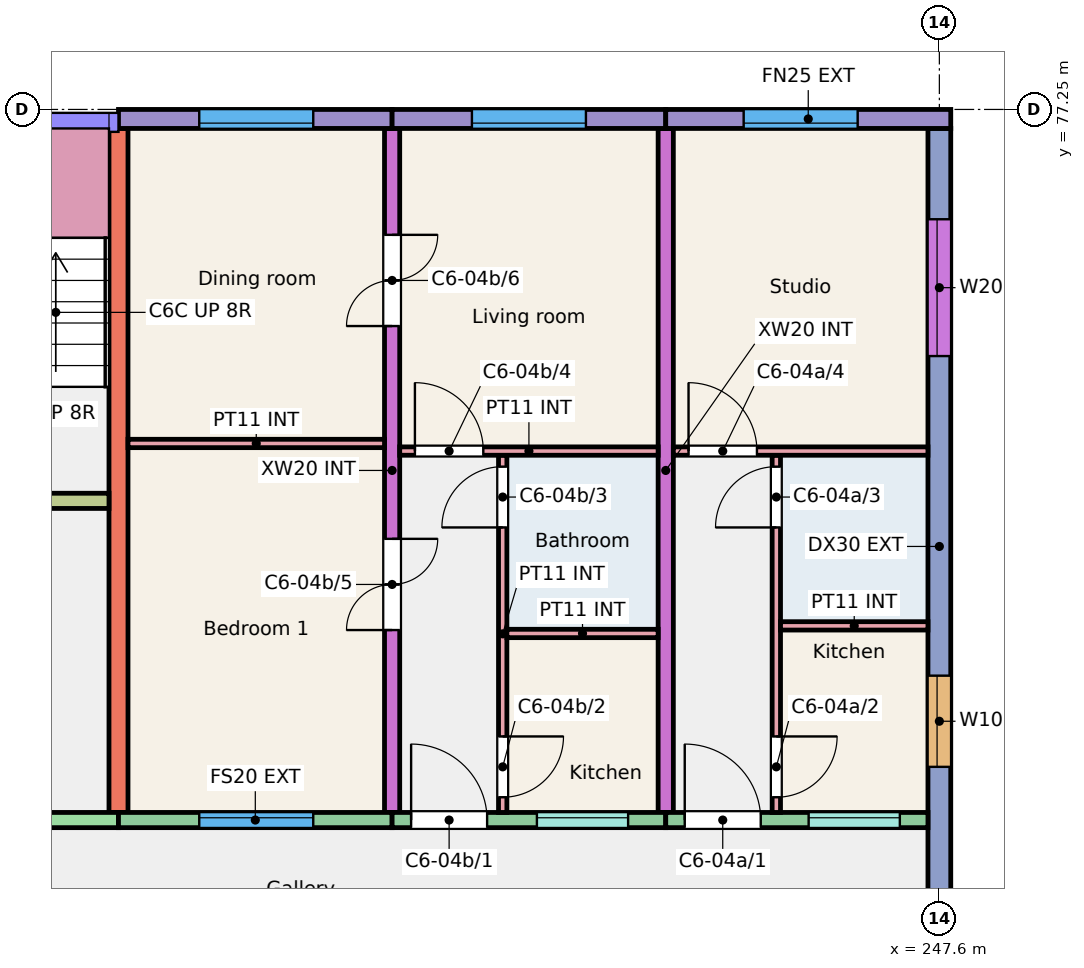
"""IFC4 building model, lengths in metres.
Left out: names, types, materials, properties, quantities, classifications, styles, units other than length and angle.
Written with IfcOpenShell. Run it as: python <this file> out.ifc"""

import sys

from ifc_helpers import new_model, si_unit, direction, frame, frame_2d, origin, place, context, subcontext, project, spatial, rectangle, extrude, element, fill, save


model = new_model("IFC4")
c1 = context("Model", 3, precision=1e-05, world=origin(), true_north=direction((0.0, 1.0)))
c2 = subcontext(c1, "Body", "Model", "MODEL_VIEW")
j1 = project(units=[si_unit("LENGTHUNIT", "METRE"), si_unit("PLANEANGLEUNIT", "RADIAN")], contexts=[c1])
p1 = place(None, origin())
s1 = spatial("IfcSite", under=j1, at=p1, CompositionType="ELEMENT")
p2 = place(p1, origin())
s2 = spatial("IfcBuilding", under=s1, at=p2, CompositionType="ELEMENT")
p3 = place(p2, frame((0.0, 0.0, 12.0)))
s3 = spatial("IfcBuildingStorey", under=s2, at=p3, CompositionType="ELEMENT", Elevation=12.0)
p4 = place(p3, frame((236.8, 68.0, 0.0), z_axis=(0.0, 0.0, 1.0), x_axis=(0.0, 1.0, 0.0)))
e1 = element("IfcWall", 1, at=p4, inside=s3, PredefinedType="SHEAR", context=c2, shape_type="SweptSolid", body=[
    extrude(rectangle(XDim=9.0, YDim=0.25, at=frame_2d((4.5, 0.0))), origin(), (0.0, 0.0, 1.0), 3.0),
])
p5 = place(p3, frame((240.4, 68.0, 0.0), z_axis=(0.0, 0.0, 1.0), x_axis=(0.0, 1.0, 0.0)))
e2 = element("IfcWall", 2, at=p5, inside=s3, PredefinedType="SHEAR", context=c2, shape_type="SweptSolid", body=[
    extrude(rectangle(XDim=9.0, YDim=0.2, at=frame_2d((4.5, 0.0))), origin(), (0.0, 0.0, 1.0), 3.0),
])
p6 = place(p5, frame((2.4, 0.0, 0.0)))
e3 = element("IfcOpeningElement", 3, at=p6, cuts=e2, PredefinedType="OPENING", context=c2, shape_type="SweptSolid", body=[
    extrude(rectangle(XDim=1.2, YDim=2.1, at=frame_2d((0.6, 1.05))), frame((0.0, 0.11, 0.0), z_axis=(0.0, -1.0, 0.0), x_axis=(1.0, 0.0, 0.0)), (0.0, 0.0, 1.0), 0.22),
])
p7 = place(p5, frame((6.4, 0.0, 0.0)))
e4 = element("IfcOpeningElement", 4, at=p7, cuts=e2, PredefinedType="OPENING", context=c2, shape_type="SweptSolid", body=[
    extrude(rectangle(XDim=1.2, YDim=2.1, at=frame_2d((0.6, 1.05))), frame((0.0, 0.11, 0.0), z_axis=(0.0, -1.0, 0.0), x_axis=(1.0, 0.0, 0.0)), (0.0, 0.0, 1.0), 0.22),
])
p8 = place(p3, frame((244.0, 68.0, 0.0), z_axis=(0.0, 0.0, 1.0), x_axis=(0.0, 1.0, 0.0)))
e5 = element("IfcWall", 5, at=p8, inside=s3, PredefinedType="SHEAR", context=c2, shape_type="SweptSolid", body=[
    extrude(rectangle(XDim=9.0, YDim=0.2, at=frame_2d((4.5, 0.0))), origin(), (0.0, 0.0, 1.0), 3.0),
])
p9 = place(p3, frame((247.6, 66.0, 0.0), z_axis=(0.0, 0.0, 1.0), x_axis=(0.0, 1.0, 0.0)))
e6 = element("IfcWall", 6, at=p9, inside=s3, PredefinedType="SHEAR", context=c2, shape_type="SweptSolid", body=[
    extrude(rectangle(XDim=11.0, YDim=0.3, at=frame_2d((5.5, 0.0))), origin(), (0.0, 0.0, 1.0), 3.0),
])
p10 = place(p9, frame((2.6, 0.0, 0.9)))
e7 = element("IfcOpeningElement", 7, at=p10, cuts=e6, PredefinedType="OPENING", context=c2, shape_type="SweptSolid", body=[
    extrude(rectangle(XDim=1.2, YDim=1.5, at=frame_2d((0.6, 0.75))), frame((0.0, 0.16, 0.0), z_axis=(0.0, -1.0, 0.0), x_axis=(1.0, 0.0, 0.0)), (0.0, 0.0, 1.0), 0.32),
])
p11 = place(p9, frame((8.005, 0.0, 0.9)))
e8 = element("IfcOpeningElement", 8, at=p11, cuts=e6, PredefinedType="OPENING", context=c2, shape_type="SweptSolid", body=[
    extrude(rectangle(XDim=1.8, YDim=1.5, at=frame_2d((0.9, 0.75))), frame((0.0, 0.16, 0.0), z_axis=(0.0, -1.0, 0.0), x_axis=(1.0, 0.0, 0.0)), (0.0, 0.0, 1.0), 0.32),
])
p12 = place(p3, frame((230.95, 67.9, 0.0), z_axis=(0.0, 0.0, 1.0), x_axis=(1.0, 0.0, 0.0)))
e9 = element("IfcWall", 9, at=p12, inside=s3, PredefinedType="SHEAR", context=c2, shape_type="SweptSolid", body=[
    extrude(rectangle(XDim=5.85, YDim=0.2, at=frame_2d((2.925, 0.0))), origin(), (0.0, 0.0, 1.0), 3.0),
])
p13 = place(p12, frame((2.312, 0.0, 0.0)))
e10 = element("IfcOpeningElement", 10, at=p13, cuts=e9, PredefinedType="OPENING", context=c2, shape_type="SweptSolid", body=[
    extrude(rectangle(XDim=1.1, YDim=2.1, at=frame_2d((0.55, 1.05))), frame((0.0, 0.11, 0.0), z_axis=(0.0, -1.0, 0.0), x_axis=(1.0, 0.0, 0.0)), (0.0, 0.0, 1.0), 0.22),
])
p14 = place(p3, frame((230.95, 72.1, 0.0), z_axis=(0.0, 0.0, 1.0), x_axis=(1.0, 0.0, 0.0)))
e11 = element("IfcWall", 11, at=p14, inside=s3, PredefinedType="SHEAR", context=c2, shape_type="SweptSolid", body=[
    extrude(rectangle(XDim=5.725, YDim=0.2, at=frame_2d((2.863, 0.0))), origin(), (0.0, 0.0, 1.0), 3.0),
])
p15 = place(p14, frame((3.775, 0.0, 0.0)))
e12 = element("IfcOpeningElement", 12, at=p15, cuts=e11, PredefinedType="OPENING", context=c2, shape_type="SweptSolid", body=[
    extrude(rectangle(XDim=1.0, YDim=2.1, at=frame_2d((0.5, 1.05))), frame((0.0, 0.11, 0.0), z_axis=(0.0, -1.0, 0.0), x_axis=(1.0, 0.0, 0.0)), (0.0, 0.0, 1.0), 0.22),
])
p16 = place(p14, frame((0.762, 0.0, 0.0)))
e13 = element("IfcOpeningElement", 13, at=p16, cuts=e11, PredefinedType="OPENING", context=c2, shape_type="SweptSolid", body=[
    extrude(rectangle(XDim=1.1, YDim=2.1, at=frame_2d((0.55, 1.05))), frame((0.0, 0.11, 0.0), z_axis=(0.0, -1.0, 0.0), x_axis=(1.0, 0.0, 0.0)), (0.0, 0.0, 1.0), 0.22),
])
p17 = place(p3, frame((236.8, 77.125, 0.0), z_axis=(0.0, 0.0, 1.0), x_axis=(1.0, 0.0, 0.0)))
e14 = element("IfcWall", 14, at=p17, inside=s3, PredefinedType="SOLIDWALL", context=c2, shape_type="SweptSolid", body=[
    extrude(rectangle(XDim=3.6, YDim=0.25, at=frame_2d((1.8, 0.0))), origin(), (0.0, 0.0, 1.0), 3.0),
])
p18 = place(p17, frame((1.062, 0.0, 0.9)))
e15 = element("IfcOpeningElement", 15, at=p18, cuts=e14, PredefinedType="OPENING", context=c2, shape_type="SweptSolid", body=[
    extrude(rectangle(XDim=1.5, YDim=1.5, at=frame_2d((0.75, 0.75))), frame((0.0, 0.135, 0.0), z_axis=(0.0, -1.0, 0.0), x_axis=(1.0, 0.0, 0.0)), (0.0, 0.0, 1.0), 0.27),
])
p19 = place(p3, frame((236.8, 67.9, 0.0), z_axis=(0.0, 0.0, 1.0), x_axis=(1.0, 0.0, 0.0)))
e16 = element("IfcWall", 16, at=p19, inside=s3, PredefinedType="SOLIDWALL", context=c2, shape_type="SweptSolid", body=[
    extrude(rectangle(XDim=3.6, YDim=0.2, at=frame_2d((1.8, 0.0))), origin(), (0.0, 0.0, 1.0), 3.0),
])
p20 = place(p19, frame((1.062, 0.0, 0.9)))
e17 = element("IfcOpeningElement", 17, at=p20, cuts=e16, PredefinedType="OPENING", context=c2, shape_type="SweptSolid", body=[
    extrude(rectangle(XDim=1.5, YDim=1.5, at=frame_2d((0.75, 0.75))), frame((0.0, 0.11, 0.0), z_axis=(0.0, -1.0, 0.0), x_axis=(1.0, 0.0, 0.0)), (0.0, 0.0, 1.0), 0.22),
])
p21 = place(p3, frame((240.4, 77.125, 0.0), z_axis=(0.0, 0.0, 1.0), x_axis=(1.0, 0.0, 0.0)))
e18 = element("IfcWall", 18, at=p21, inside=s3, PredefinedType="SOLIDWALL", context=c2, shape_type="SweptSolid", body=[
    extrude(rectangle(XDim=3.6, YDim=0.25, at=frame_2d((1.8, 0.0))), origin(), (0.0, 0.0, 1.0), 3.0),
])
p22 = place(p21, frame((1.05, 0.0, 0.9)))
e19 = element("IfcOpeningElement", 19, at=p22, cuts=e18, PredefinedType="OPENING", context=c2, shape_type="SweptSolid", body=[
    extrude(rectangle(XDim=1.5, YDim=1.5, at=frame_2d((0.75, 0.75))), frame((0.0, 0.135, 0.0), z_axis=(0.0, -1.0, 0.0), x_axis=(1.0, 0.0, 0.0)), (0.0, 0.0, 1.0), 0.27),
])
p23 = place(p3, frame((240.4, 67.9, 0.0), z_axis=(0.0, 0.0, 1.0), x_axis=(1.0, 0.0, 0.0)))
e20 = element("IfcWall", 20, at=p23, inside=s3, PredefinedType="SOLIDWALL", context=c2, shape_type="SweptSolid", body=[
    extrude(rectangle(XDim=3.6, YDim=0.2, at=frame_2d((1.8, 0.0))), origin(), (0.0, 0.0, 1.0), 3.0),
])
p24 = place(p23, frame((1.905, 0.0, 1.1)))
e21 = element("IfcOpeningElement", 21, at=p24, cuts=e20, PredefinedType="OPENING", context=c2, shape_type="SweptSolid", body=[
    extrude(rectangle(XDim=1.2, YDim=1.3, at=frame_2d((0.6, 0.65))), frame((0.0, 0.11, 0.0), z_axis=(0.0, -1.0, 0.0), x_axis=(1.0, 0.0, 0.0)), (0.0, 0.0, 1.0), 0.22),
])
p25 = place(p23, frame((0.25, 0.0, 0.0)))
e22 = element("IfcOpeningElement", 22, at=p25, cuts=e20, PredefinedType="OPENING", context=c2, shape_type="SweptSolid", body=[
    extrude(rectangle(XDim=1.0, YDim=2.1, at=frame_2d((0.5, 1.05))), frame((0.0, 0.11, 0.0), z_axis=(0.0, -1.0, 0.0), x_axis=(1.0, 0.0, 0.0)), (0.0, 0.0, 1.0), 0.22),
])
p26 = place(p3, frame((244.0, 77.125, 0.0), z_axis=(0.0, 0.0, 1.0), x_axis=(1.0, 0.0, 0.0)))
e23 = element("IfcWall", 23, at=p26, inside=s3, PredefinedType="SOLIDWALL", context=c2, shape_type="SweptSolid", body=[
    extrude(rectangle(XDim=3.75, YDim=0.25, at=frame_2d((1.875, 0.0))), origin(), (0.0, 0.0, 1.0), 3.0),
])
p27 = place(p26, frame((1.025, 0.0, 0.9)))
e24 = element("IfcOpeningElement", 24, at=p27, cuts=e23, PredefinedType="OPENING", context=c2, shape_type="SweptSolid", body=[
    extrude(rectangle(XDim=1.5, YDim=1.5, at=frame_2d((0.75, 0.75))), frame((0.0, 0.135, 0.0), z_axis=(0.0, -1.0, 0.0), x_axis=(1.0, 0.0, 0.0)), (0.0, 0.0, 1.0), 0.27),
])
p28 = place(p3, frame((244.0, 67.9, 0.0), z_axis=(0.0, 0.0, 1.0), x_axis=(1.0, 0.0, 0.0)))
e25 = element("IfcWall", 25, at=p28, inside=s3, PredefinedType="SOLIDWALL", context=c2, shape_type="SweptSolid", body=[
    extrude(rectangle(XDim=3.45, YDim=0.2, at=frame_2d((1.725, 0.0))), origin(), (0.0, 0.0, 1.0), 3.0),
])
p29 = place(p28, frame((1.88, 0.0, 1.1)))
e26 = element("IfcOpeningElement", 26, at=p29, cuts=e25, PredefinedType="OPENING", context=c2, shape_type="SweptSolid", body=[
    extrude(rectangle(XDim=1.2, YDim=1.3, at=frame_2d((0.6, 0.65))), frame((0.0, 0.11, 0.0), z_axis=(0.0, -1.0, 0.0), x_axis=(1.0, 0.0, 0.0)), (0.0, 0.0, 1.0), 0.22),
])
p30 = place(p28, frame((0.25, 0.0, 0.0)))
e27 = element("IfcOpeningElement", 27, at=p30, cuts=e25, PredefinedType="OPENING", context=c2, shape_type="SweptSolid", body=[
    extrude(rectangle(XDim=1.0, YDim=2.1, at=frame_2d((0.5, 1.05))), frame((0.0, 0.11, 0.0), z_axis=(0.0, -1.0, 0.0), x_axis=(1.0, 0.0, 0.0)), (0.0, 0.0, 1.0), 0.22),
])
p31 = place(p3, frame((245.455, 68.0, 0.0), z_axis=(0.0, 0.0, 1.0), x_axis=(0.0, 1.0, 0.0)))
e28 = element("IfcWall", 28, at=p31, inside=s3, PredefinedType="PARTITIONING", context=c2, shape_type="SweptSolid", body=[
    extrude(rectangle(XDim=4.7, YDim=0.11, at=frame_2d((2.35, 0.0))), origin(), (0.0, 0.0, 1.0), 2.8),
])
p32 = place(p31, frame((0.2, 0.0, 0.0)))
e29 = element("IfcOpeningElement", 29, at=p32, cuts=e28, PredefinedType="OPENING", context=c2, shape_type="SweptSolid", body=[
    extrude(rectangle(XDim=0.8, YDim=2.1, at=frame_2d((0.4, 1.05))), frame((0.0, 0.065, 0.0), z_axis=(0.0, -1.0, 0.0), x_axis=(1.0, 0.0, 0.0)), (0.0, 0.0, 1.0), 0.13),
])
p33 = place(p31, frame((3.75, 0.0, 0.0)))
e30 = element("IfcOpeningElement", 30, at=p33, cuts=e28, PredefinedType="OPENING", context=c2, shape_type="SweptSolid", body=[
    extrude(rectangle(XDim=0.8, YDim=2.1, at=frame_2d((0.4, 1.05))), frame((0.0, 0.065, 0.0), z_axis=(0.0, -1.0, 0.0), x_axis=(1.0, 0.0, 0.0)), (0.0, 0.0, 1.0), 0.13),
])
p34 = place(p3, frame((245.51, 70.455, 0.0), z_axis=(0.0, 0.0, 1.0), x_axis=(1.0, 0.0, 0.0)))
e31 = element("IfcWall", 31, at=p34, inside=s3, PredefinedType="PARTITIONING", context=c2, shape_type="SweptSolid", body=[
    extrude(rectangle(XDim=1.94, YDim=0.11, at=frame_2d((0.97, 0.0))), origin(), (0.0, 0.0, 1.0), 2.8),
])
p35 = place(p3, frame((244.1, 72.755, 0.0), z_axis=(0.0, 0.0, 1.0), x_axis=(1.0, 0.0, 0.0)))
e32 = element("IfcWall", 32, at=p35, inside=s3, PredefinedType="PARTITIONING", context=c2, shape_type="SweptSolid", body=[
    extrude(rectangle(XDim=3.35, YDim=0.11, at=frame_2d((1.675, 0.0))), origin(), (0.0, 0.0, 1.0), 2.8),
])
p36 = place(p35, frame((0.2, 0.0, 0.0)))
e33 = element("IfcOpeningElement", 33, at=p36, cuts=e32, PredefinedType="OPENING", context=c2, shape_type="SweptSolid", body=[
    extrude(rectangle(XDim=0.9, YDim=2.1, at=frame_2d((0.45, 1.05))), frame((0.0, 0.065, 0.0), z_axis=(0.0, -1.0, 0.0), x_axis=(1.0, 0.0, 0.0)), (0.0, 0.0, 1.0), 0.13),
])
p37 = place(p3, frame((241.855, 68.0, 0.0), z_axis=(0.0, 0.0, 1.0), x_axis=(0.0, 1.0, 0.0)))
e34 = element("IfcWall", 34, at=p37, inside=s3, PredefinedType="PARTITIONING", context=c2, shape_type="SweptSolid", body=[
    extrude(rectangle(XDim=4.7, YDim=0.11, at=frame_2d((2.35, 0.0))), origin(), (0.0, 0.0, 1.0), 2.8),
])
p38 = place(p37, frame((0.2, 0.0, 0.0)))
e35 = element("IfcOpeningElement", 35, at=p38, cuts=e34, PredefinedType="OPENING", context=c2, shape_type="SweptSolid", body=[
    extrude(rectangle(XDim=0.8, YDim=2.1, at=frame_2d((0.4, 1.05))), frame((0.0, 0.065, 0.0), z_axis=(0.0, -1.0, 0.0), x_axis=(1.0, 0.0, 0.0)), (0.0, 0.0, 1.0), 0.13),
])
p39 = place(p37, frame((3.75, 0.0, 0.0)))
e36 = element("IfcOpeningElement", 36, at=p39, cuts=e34, PredefinedType="OPENING", context=c2, shape_type="SweptSolid", body=[
    extrude(rectangle(XDim=0.8, YDim=2.1, at=frame_2d((0.4, 1.05))), frame((0.0, 0.065, 0.0), z_axis=(0.0, -1.0, 0.0), x_axis=(1.0, 0.0, 0.0)), (0.0, 0.0, 1.0), 0.13),
])
p40 = place(p3, frame((241.91, 70.355, 0.0), z_axis=(0.0, 0.0, 1.0), x_axis=(1.0, 0.0, 0.0)))
e37 = element("IfcWall", 37, at=p40, inside=s3, PredefinedType="PARTITIONING", context=c2, shape_type="SweptSolid", body=[
    extrude(rectangle(XDim=1.99, YDim=0.11, at=frame_2d((0.995, 0.0))), origin(), (0.0, 0.0, 1.0), 2.8),
])
p41 = place(p3, frame((240.5, 72.755, 0.0), z_axis=(0.0, 0.0, 1.0), x_axis=(1.0, 0.0, 0.0)))
e38 = element("IfcWall", 38, at=p41, inside=s3, PredefinedType="PARTITIONING", context=c2, shape_type="SweptSolid", body=[
    extrude(rectangle(XDim=3.4, YDim=0.11, at=frame_2d((1.7, 0.0))), origin(), (0.0, 0.0, 1.0), 2.8),
])
p42 = place(p41, frame((0.2, 0.0, 0.0)))
e39 = element("IfcOpeningElement", 39, at=p42, cuts=e38, PredefinedType="OPENING", context=c2, shape_type="SweptSolid", body=[
    extrude(rectangle(XDim=0.9, YDim=2.1, at=frame_2d((0.45, 1.05))), frame((0.0, 0.065, 0.0), z_axis=(0.0, -1.0, 0.0), x_axis=(1.0, 0.0, 0.0)), (0.0, 0.0, 1.0), 0.13),
])
p43 = place(p3, frame((236.925, 72.855, 0.0), z_axis=(0.0, 0.0, 1.0), x_axis=(1.0, 0.0, 0.0)))
e40 = element("IfcWall", 40, at=p43, inside=s3, PredefinedType="PARTITIONING", context=c2, shape_type="SweptSolid", body=[
    extrude(rectangle(XDim=3.375, YDim=0.11, at=frame_2d((1.688, 0.0))), origin(), (0.0, 0.0, 1.0), 2.8),
])
p44 = place(p29, origin())
e41 = element("IfcWindow", 41, at=p44, inside=s3, PartitioningType="SINGLE_PANEL", PredefinedType="WINDOW", context=c2, shape_type="SweptSolid", body=[
    extrude(rectangle(XDim=1.2, YDim=1.3, at=frame_2d((0.6, 0.65))), frame((0.0, 0.06, 0.0), z_axis=(0.0, -1.0, 0.0), x_axis=(1.0, 0.0, 0.0)), (0.0, 0.0, 1.0), 0.06),
])
fill(e26, e41)
p45 = place(p27, origin())
e42 = element("IfcWindow", 42, at=p45, inside=s3, PartitioningType="SINGLE_PANEL", PredefinedType="WINDOW", context=c2, shape_type="SweptSolid", body=[
    extrude(rectangle(XDim=1.5, YDim=1.5, at=frame_2d((0.75, 0.75))), frame((0.0, -0.025, 0.0), z_axis=(0.0, -1.0, 0.0), x_axis=(1.0, 0.0, 0.0)), (0.0, 0.0, 1.0), 0.06),
])
fill(e24, e42)
p46 = place(p10, origin())
e43 = element("IfcWindow", 43, at=p46, inside=s3, PartitioningType="SINGLE_PANEL", PredefinedType="WINDOW", context=c2, shape_type="SweptSolid", body=[
    extrude(rectangle(XDim=1.2, YDim=1.5, at=frame_2d((0.6, 0.75))), frame((0.0, 0.06, 0.0), z_axis=(0.0, -1.0, 0.0), x_axis=(1.0, 0.0, 0.0)), (0.0, 0.0, 1.0), 0.06),
])
fill(e7, e43)
p47 = place(p11, origin())
e44 = element("IfcWindow", 44, at=p47, inside=s3, PartitioningType="SINGLE_PANEL", PredefinedType="WINDOW", context=c2, shape_type="SweptSolid", body=[
    extrude(rectangle(XDim=1.8, YDim=1.5, at=frame_2d((0.9, 0.75))), frame((0.0, 0.06, 0.0), z_axis=(0.0, -1.0, 0.0), x_axis=(1.0, 0.0, 0.0)), (0.0, 0.0, 1.0), 0.06),
])
fill(e8, e44)
p48 = place(p20, origin())
e45 = element("IfcWindow", 45, at=p48, inside=s3, PartitioningType="SINGLE_PANEL", PredefinedType="WINDOW", context=c2, shape_type="SweptSolid", body=[
    extrude(rectangle(XDim=1.5, YDim=1.5, at=frame_2d((0.75, 0.75))), frame((0.0, 0.06, 0.0), z_axis=(0.0, -1.0, 0.0), x_axis=(1.0, 0.0, 0.0)), (0.0, 0.0, 1.0), 0.06),
])
fill(e17, e45)
p49 = place(p18, origin())
e46 = element("IfcWindow", 46, at=p49, inside=s3, PartitioningType="SINGLE_PANEL", PredefinedType="WINDOW", context=c2, shape_type="SweptSolid", body=[
    extrude(rectangle(XDim=1.5, YDim=1.5, at=frame_2d((0.75, 0.75))), frame((0.0, -0.025, 0.0), z_axis=(0.0, -1.0, 0.0), x_axis=(1.0, 0.0, 0.0)), (0.0, 0.0, 1.0), 0.06),
])
fill(e15, e46)
p50 = place(p24, origin())
e47 = element("IfcWindow", 47, at=p50, inside=s3, PartitioningType="SINGLE_PANEL", PredefinedType="WINDOW", context=c2, shape_type="SweptSolid", body=[
    extrude(rectangle(XDim=1.2, YDim=1.3, at=frame_2d((0.6, 0.65))), frame((0.0, 0.06, 0.0), z_axis=(0.0, -1.0, 0.0), x_axis=(1.0, 0.0, 0.0)), (0.0, 0.0, 1.0), 0.06),
])
fill(e21, e47)
p51 = place(p22, origin())
e48 = element("IfcWindow", 48, at=p51, inside=s3, PartitioningType="SINGLE_PANEL", PredefinedType="WINDOW", context=c2, shape_type="SweptSolid", body=[
    extrude(rectangle(XDim=1.5, YDim=1.5, at=frame_2d((0.75, 0.75))), frame((0.0, -0.025, 0.0), z_axis=(0.0, -1.0, 0.0), x_axis=(1.0, 0.0, 0.0)), (0.0, 0.0, 1.0), 0.06),
])
fill(e19, e48)
p52 = place(p30, origin())
e49 = element("IfcDoor", 49, at=p52, inside=s3, OperationType="SINGLE_SWING_LEFT", PredefinedType="DOOR", context=c2, shape_type="SweptSolid", body=[
    extrude(rectangle(XDim=1.0, YDim=2.1, at=frame_2d((0.5, 1.05))), frame((0.0, 0.025, 0.0), z_axis=(0.0, -1.0, 0.0), x_axis=(1.0, 0.0, 0.0)), (0.0, 0.0, 1.0), 0.05),
])
fill(e27, e49)
p53 = place(p32, origin())
e50 = element("IfcDoor", 50, at=p53, inside=s3, OperationType="SINGLE_SWING_RIGHT", PredefinedType="DOOR", context=c2, shape_type="SweptSolid", body=[
    extrude(rectangle(XDim=0.8, YDim=2.1, at=frame_2d((0.4, 1.05))), frame((0.0, 0.025, 0.0), z_axis=(0.0, -1.0, 0.0), x_axis=(1.0, 0.0, 0.0)), (0.0, 0.0, 1.0), 0.05),
])
fill(e29, e50)
p54 = place(p33, origin())
e51 = element("IfcDoor", 51, at=p54, inside=s3, OperationType="SINGLE_SWING_LEFT", PredefinedType="DOOR", context=c2, shape_type="SweptSolid", body=[
    extrude(rectangle(XDim=0.8, YDim=2.1, at=frame_2d((0.4, 1.05))), frame((0.0, 0.025, 0.0), z_axis=(0.0, -1.0, 0.0), x_axis=(1.0, 0.0, 0.0)), (0.0, 0.0, 1.0), 0.05),
])
fill(e30, e51)
p55 = place(p36, origin())
e52 = element("IfcDoor", 52, at=p55, inside=s3, OperationType="SINGLE_SWING_LEFT", PredefinedType="DOOR", context=c2, shape_type="SweptSolid", body=[
    extrude(rectangle(XDim=0.9, YDim=2.1, at=frame_2d((0.45, 1.05))), frame((0.0, 0.025, 0.0), z_axis=(0.0, -1.0, 0.0), x_axis=(1.0, 0.0, 0.0)), (0.0, 0.0, 1.0), 0.05),
])
fill(e33, e52)
p56 = place(p25, origin())
e53 = element("IfcDoor", 53, at=p56, inside=s3, OperationType="SINGLE_SWING_LEFT", PredefinedType="DOOR", context=c2, shape_type="SweptSolid", body=[
    extrude(rectangle(XDim=1.0, YDim=2.1, at=frame_2d((0.5, 1.05))), frame((0.0, 0.025, 0.0), z_axis=(0.0, -1.0, 0.0), x_axis=(1.0, 0.0, 0.0)), (0.0, 0.0, 1.0), 0.05),
])
fill(e22, e53)
p57 = place(p38, origin())
e54 = element("IfcDoor", 54, at=p57, inside=s3, OperationType="SINGLE_SWING_RIGHT", PredefinedType="DOOR", context=c2, shape_type="SweptSolid", body=[
    extrude(rectangle(XDim=0.8, YDim=2.1, at=frame_2d((0.4, 1.05))), frame((0.0, 0.025, 0.0), z_axis=(0.0, -1.0, 0.0), x_axis=(1.0, 0.0, 0.0)), (0.0, 0.0, 1.0), 0.05),
])
fill(e35, e54)
p58 = place(p39, origin())
e55 = element("IfcDoor", 55, at=p58, inside=s3, OperationType="SINGLE_SWING_LEFT", PredefinedType="DOOR", context=c2, shape_type="SweptSolid", body=[
    extrude(rectangle(XDim=0.8, YDim=2.1, at=frame_2d((0.4, 1.05))), frame((0.0, 0.025, 0.0), z_axis=(0.0, -1.0, 0.0), x_axis=(1.0, 0.0, 0.0)), (0.0, 0.0, 1.0), 0.05),
])
fill(e36, e55)
p59 = place(p42, origin())
e56 = element("IfcDoor", 56, at=p59, inside=s3, OperationType="SINGLE_SWING_LEFT", PredefinedType="DOOR", context=c2, shape_type="SweptSolid", body=[
    extrude(rectangle(XDim=0.9, YDim=2.1, at=frame_2d((0.45, 1.05))), frame((0.0, 0.025, 0.0), z_axis=(0.0, -1.0, 0.0), x_axis=(1.0, 0.0, 0.0)), (0.0, 0.0, 1.0), 0.05),
])
fill(e39, e56)
p60 = place(p6, origin())
e57 = element("IfcDoor", 57, at=p60, inside=s3, OperationType="DOUBLE_DOOR_SINGLE_SWING", PredefinedType="DOOR", context=c2, shape_type="SweptSolid", body=[
    extrude(rectangle(XDim=1.2, YDim=2.1, at=frame_2d((0.6, 1.05))), frame((0.0, 0.025, 0.0), z_axis=(0.0, -1.0, 0.0), x_axis=(1.0, 0.0, 0.0)), (0.0, 0.0, 1.0), 0.05),
])
fill(e3, e57)
p61 = place(p7, origin())
e58 = element("IfcDoor", 58, at=p61, inside=s3, OperationType="DOUBLE_DOOR_SINGLE_SWING", PredefinedType="DOOR", context=c2, shape_type="SweptSolid", body=[
    extrude(rectangle(XDim=1.2, YDim=2.1, at=frame_2d((0.6, 1.05))), frame((0.0, 0.025, 0.0), z_axis=(0.0, -1.0, 0.0), x_axis=(1.0, 0.0, 0.0)), (0.0, 0.0, 1.0), 0.05),
])
fill(e4, e58)
save(model, sys.argv[1])
